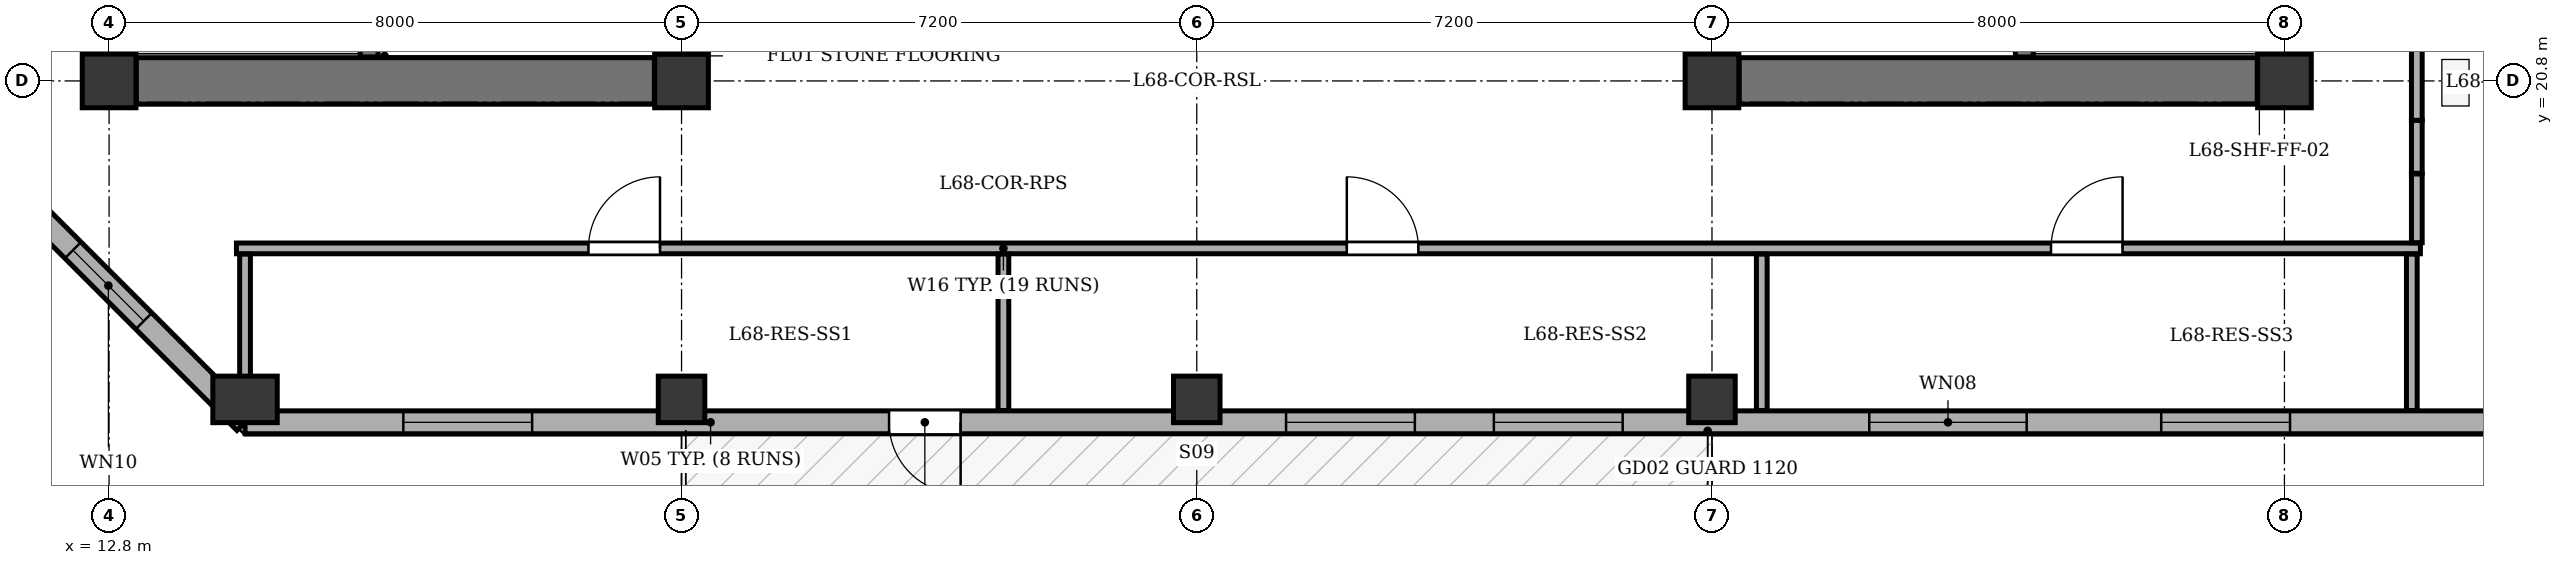
"""IFC4 building model, lengths in metres.
Left out: names, types, materials, properties, quantities, classifications, styles, units other than length and angle.
Written with IfcOpenShell. Run it as: python <this file> out.ifc"""

import sys

from ifc_helpers import new_model, si_unit, direction, frame, frame_2d, origin, origin_2d, place, context, subcontext, project, spatial, rectangle, extrude, element, fill, save


model = new_model("IFC4")
c1 = context("Model", 3, precision=1e-05, world=origin(), true_north=direction((0.0, 1.0)))
c2 = subcontext(c1, "Body", "Model", "MODEL_VIEW")
j1 = project(units=[si_unit("LENGTHUNIT", "METRE"), si_unit("PLANEANGLEUNIT", "RADIAN")], contexts=[c1])
p1 = place(None, origin())
s1 = spatial("IfcSite", under=j1, at=p1, CompositionType="ELEMENT")
p2 = place(p1, origin())
s2 = spatial("IfcBuilding", under=s1, at=p2, CompositionType="ELEMENT")
p3 = place(p2, frame((0.0, 0.0, 258.5)))
s3 = spatial("IfcBuildingStorey", under=s2, at=p3, CompositionType="ELEMENT", Elevation=258.5)
for number, where, z_axis, x_axis in (
    (1, (12.8, 20.8, 0.0), (0.0, 0.0, 1.0), (1.0, 0.0, 0.0)),
    (2, (20.8, 20.8, 0.0), (0.0, 0.0, 1.0), (1.0, 0.0, 0.0)),
    (3, (35.2, 20.8, 0.0), (0.0, 0.0, 1.0), (1.0, 0.0, 0.0)),
    (4, (43.2, 20.8, 0.0), (0.0, 0.0, 1.0), (1.0, 0.0, 0.0)),
):
    element("IfcColumn", number, at=place(p3, frame(where, z_axis=z_axis, x_axis=x_axis)), inside=s3, PredefinedType="COLUMN", context=c2, shape_type="SweptSolid", body=[
        extrude(rectangle(XDim=0.75, YDim=0.75, at=origin_2d()), origin(), (0.0, 0.0, 1.0), 3.4),
    ])
p4 = place(p3, frame((14.7, 16.35, 0.0), z_axis=(0.0, 0.0, 1.0), x_axis=(1.0, 0.0, 0.0)))
e5 = element("IfcColumn", 5, at=p4, inside=s3, PredefinedType="COLUMN", context=c2, shape_type="SweptSolid", body=[
    extrude(rectangle(XDim=0.65, YDim=0.9, at=origin_2d()), origin(), (0.0, 0.0, 1.0), 3.4),
])
for number, where, z_axis, x_axis in (
    (6, (20.8, 16.35, 0.0), (0.0, 0.0, 1.0), (1.0, 0.0, 0.0)),
    (7, (28.0, 16.35, 0.0), (0.0, 0.0, 1.0), (1.0, 0.0, 0.0)),
    (8, (35.2, 16.35, 0.0), (0.0, 0.0, 1.0), (1.0, 0.0, 0.0)),
):
    element("IfcColumn", number, at=place(p3, frame(where, z_axis=z_axis, x_axis=x_axis)), inside=s3, PredefinedType="COLUMN", context=c2, shape_type="SweptSolid", body=[
        extrude(rectangle(XDim=0.65, YDim=0.65, at=origin_2d()), origin(), (0.0, 0.0, 1.0), 3.4),
    ])
p5 = place(p3, frame((51.7, 16.03, 0.0), z_axis=(0.0, 0.0, 1.0), x_axis=(-1.0, 0.0, 0.0)))
e9 = element("IfcWall", 9, at=p5, inside=s3, PredefinedType="STANDARD", context=c2, shape_type="SweptSolid", body=[
    extrude(rectangle(XDim=37.0, YDim=0.32, at=frame_2d((18.5, 0.0))), origin(), (0.0, 0.0, 1.0), 2.725),
])
p6 = place(p5, frame((27.0, 0.0, 0.0)))
e10 = element("IfcOpeningElement", 10, at=p6, cuts=e9, PredefinedType="OPENING", context=c2, shape_type="SweptSolid", body=[
    extrude(rectangle(XDim=1.0, YDim=2.02, at=frame_2d((0.5, 1.01))), frame((0.0, 0.17, 0.0), z_axis=(0.0, -1.0, 0.0), x_axis=(1.0, 0.0, 0.0)), (0.0, 0.0, 1.0), 0.34),
])
p7 = place(p5, frame((1.235, 0.0, 0.75)))
e11 = element("IfcOpeningElement", 11, at=p7, cuts=e9, PredefinedType="OPENING", context=c2, shape_type="SweptSolid", body=[
    extrude(rectangle(XDim=1.8, YDim=1.7, at=frame_2d((0.9, 0.85))), frame((0.0, 0.17, 0.0), z_axis=(0.0, -1.0, 0.0), x_axis=(1.0, 0.0, 0.0)), (0.0, 0.0, 1.0), 0.34),
])
p8 = place(p5, frame((3.885, 0.0, 0.75)))
e12 = element("IfcOpeningElement", 12, at=p8, cuts=e9, PredefinedType="OPENING", context=c2, shape_type="SweptSolid", body=[
    extrude(rectangle(XDim=1.8, YDim=1.7, at=frame_2d((0.9, 0.85))), frame((0.0, 0.17, 0.0), z_axis=(0.0, -1.0, 0.0), x_axis=(1.0, 0.0, 0.0)), (0.0, 0.0, 1.0), 0.34),
])
p9 = place(p5, frame((8.422, 0.0, 0.75)))
e13 = element("IfcOpeningElement", 13, at=p9, cuts=e9, PredefinedType="OPENING", context=c2, shape_type="SweptSolid", body=[
    extrude(rectangle(XDim=1.8, YDim=1.7, at=frame_2d((0.9, 0.85))), frame((0.0, 0.17, 0.0), z_axis=(0.0, -1.0, 0.0), x_axis=(1.0, 0.0, 0.0)), (0.0, 0.0, 1.0), 0.34),
])
p10 = place(p5, frame((12.102, 0.0, 0.75)))
e14 = element("IfcOpeningElement", 14, at=p10, cuts=e9, PredefinedType="OPENING", context=c2, shape_type="SweptSolid", body=[
    extrude(rectangle(XDim=2.2, YDim=1.7, at=frame_2d((1.1, 0.85))), frame((0.0, 0.17, 0.0), z_axis=(0.0, -1.0, 0.0), x_axis=(1.0, 0.0, 0.0)), (0.0, 0.0, 1.0), 0.34),
])
p11 = place(p5, frame((17.748, 0.0, 0.75)))
e15 = element("IfcOpeningElement", 15, at=p11, cuts=e9, PredefinedType="OPENING", context=c2, shape_type="SweptSolid", body=[
    extrude(rectangle(XDim=1.8, YDim=1.7, at=frame_2d((0.9, 0.85))), frame((0.0, 0.17, 0.0), z_axis=(0.0, -1.0, 0.0), x_axis=(1.0, 0.0, 0.0)), (0.0, 0.0, 1.0), 0.34),
])
p12 = place(p5, frame((20.652, 0.0, 0.75)))
e16 = element("IfcOpeningElement", 16, at=p12, cuts=e9, PredefinedType="OPENING", context=c2, shape_type="SweptSolid", body=[
    extrude(rectangle(XDim=1.8, YDim=1.7, at=frame_2d((0.9, 0.85))), frame((0.0, 0.17, 0.0), z_axis=(0.0, -1.0, 0.0), x_axis=(1.0, 0.0, 0.0)), (0.0, 0.0, 1.0), 0.34),
])
p13 = place(p5, frame((32.988, 0.0, 0.75)))
e17 = element("IfcOpeningElement", 17, at=p13, cuts=e9, PredefinedType="OPENING", context=c2, shape_type="SweptSolid", body=[
    extrude(rectangle(XDim=1.8, YDim=1.7, at=frame_2d((0.9, 0.85))), frame((0.0, 0.17, 0.0), z_axis=(0.0, -1.0, 0.0), x_axis=(1.0, 0.0, 0.0)), (0.0, 0.0, 1.0), 0.34),
])
p14 = place(p3, frame((14.7, 16.03, 0.0), z_axis=(0.0, 0.0, 1.0), x_axis=(-0.707106781187, 0.707106781187, 0.0)))
e18 = element("IfcWall", 18, at=p14, inside=s3, PredefinedType="STANDARD", context=c2, shape_type="SweptSolid", body=[
    extrude(rectangle(XDim=5.402, YDim=0.32, at=frame_2d((2.701, 0.0))), origin(), (0.0, 0.0, 1.0), 2.725),
])
p15 = place(p14, frame((2.001, 0.0, 0.75)))
e19 = element("IfcOpeningElement", 19, at=p15, cuts=e18, PredefinedType="OPENING", context=c2, shape_type="SweptSolid", body=[
    extrude(rectangle(XDim=1.4, YDim=1.65, at=frame_2d((0.7, 0.825))), frame((0.0, 0.17, 0.0), z_axis=(0.0, -1.0, 0.0), x_axis=(1.0, 0.0, 0.0)), (0.0, 0.0, 1.0), 0.34),
])
p16 = place(p3, frame((12.8, 21.18, 0.0), z_axis=(0.0, 0.0, 1.0), x_axis=(0.0, 1.0, 0.0)))
e20 = element("IfcWall", 20, at=p16, inside=s3, PredefinedType="SHEAR", context=c2, shape_type="SweptSolid", body=[
    extrude(rectangle(XDim=12.04, YDim=0.65, at=frame_2d((6.02, 0.0))), origin(), (0.0, 0.0, 1.0), 3.1),
])
p17 = place(p3, frame((13.18, 20.8, 0.0), z_axis=(0.0, 0.0, 1.0), x_axis=(1.0, 0.0, 0.0)))
e21 = element("IfcWall", 21, at=p17, inside=s3, PredefinedType="SHEAR", context=c2, shape_type="SweptSolid", body=[
    extrude(rectangle(XDim=7.24, YDim=0.65, at=frame_2d((3.62, 0.0))), origin(), (0.0, 0.0, 1.0), 3.1),
])
p18 = place(p3, frame((20.8, 21.18, 0.0), z_axis=(0.0, 0.0, 1.0), x_axis=(0.0, 1.0, 0.0)))
e22 = element("IfcWall", 22, at=p18, inside=s3, PredefinedType="SHEAR", context=c2, shape_type="SweptSolid", body=[
    extrude(rectangle(XDim=3.87, YDim=0.65, at=frame_2d((1.935, 0.0))), origin(), (0.0, 0.0, 1.0), 3.1),
])
p19 = place(p18, frame((1.42, 0.0, 0.0)))
e23 = element("IfcOpeningElement", 23, at=p19, cuts=e22, PredefinedType="OPENING", context=c2, shape_type="SweptSolid", body=[
    extrude(rectangle(XDim=1.2, YDim=2.15, at=frame_2d((0.6, 1.075))), frame((0.0, 0.335, 0.0), z_axis=(0.0, -1.0, 0.0), x_axis=(1.0, 0.0, 0.0)), (0.0, 0.0, 1.0), 0.67),
])
p20 = place(p3, frame((16.435, 21.135, 0.0), z_axis=(0.0, 0.0, 1.0), x_axis=(0.0, 1.0, 0.0)))
e24 = element("IfcWall", 24, at=p20, inside=s3, PredefinedType="SHEAR", context=c2, shape_type="SweptSolid", body=[
    extrude(rectangle(XDim=12.13, YDim=0.25, at=frame_2d((6.065, 0.0))), origin(), (0.0, 0.0, 1.0), 3.1),
])
p21 = place(p20, frame((0.515, 0.0, 0.0)))
e25 = element("IfcOpeningElement", 25, at=p21, cuts=e24, PredefinedType="OPENING", context=c2, shape_type="SweptSolid", body=[
    extrude(rectangle(XDim=1.2, YDim=2.15, at=frame_2d((0.6, 1.075))), frame((0.0, 0.135, 0.0), z_axis=(0.0, -1.0, 0.0), x_axis=(1.0, 0.0, 0.0)), (0.0, 0.0, 1.0), 0.27),
])
p22 = place(p20, frame((2.665, 0.0, 0.0)))
e26 = element("IfcOpeningElement", 26, at=p22, cuts=e24, PredefinedType="OPENING", context=c2, shape_type="SweptSolid", body=[
    extrude(rectangle(XDim=1.15, YDim=2.15, at=frame_2d((0.575, 1.075))), frame((0.0, 0.135, 0.0), z_axis=(0.0, -1.0, 0.0), x_axis=(1.0, 0.0, 0.0)), (0.0, 0.0, 1.0), 0.27),
])
p23 = place(p3, frame((43.2, 21.18, 0.0), z_axis=(0.0, 0.0, 1.0), x_axis=(0.0, 1.0, 0.0)))
e27 = element("IfcWall", 27, at=p23, inside=s3, PredefinedType="SHEAR", context=c2, shape_type="SweptSolid", body=[
    extrude(rectangle(XDim=12.04, YDim=0.65, at=frame_2d((6.02, 0.0))), origin(), (0.0, 0.0, 1.0), 3.1),
])
p24 = place(p3, frame((35.58, 20.8, 0.0), z_axis=(0.0, 0.0, 1.0), x_axis=(1.0, 0.0, 0.0)))
e28 = element("IfcWall", 28, at=p24, inside=s3, PredefinedType="SHEAR", context=c2, shape_type="SweptSolid", body=[
    extrude(rectangle(XDim=7.24, YDim=0.65, at=frame_2d((3.62, 0.0))), origin(), (0.0, 0.0, 1.0), 3.1),
])
p25 = place(p3, frame((35.2, 21.18, 0.0), z_axis=(0.0, 0.0, 1.0), x_axis=(0.0, 1.0, 0.0)))
e29 = element("IfcWall", 29, at=p25, inside=s3, PredefinedType="SHEAR", context=c2, shape_type="SweptSolid", body=[
    extrude(rectangle(XDim=3.87, YDim=0.65, at=frame_2d((1.935, 0.0))), origin(), (0.0, 0.0, 1.0), 3.1),
])
p26 = place(p25, frame((1.42, 0.0, 0.0)))
e30 = element("IfcOpeningElement", 30, at=p26, cuts=e29, PredefinedType="OPENING", context=c2, shape_type="SweptSolid", body=[
    extrude(rectangle(XDim=1.2, YDim=2.15, at=frame_2d((0.6, 1.075))), frame((0.0, 0.335, 0.0), z_axis=(0.0, -1.0, 0.0), x_axis=(1.0, 0.0, 0.0)), (0.0, 0.0, 1.0), 0.67),
])
p27 = place(p3, frame((39.565, 21.135, 0.0), z_axis=(0.0, 0.0, 1.0), x_axis=(0.0, 1.0, 0.0)))
e31 = element("IfcWall", 31, at=p27, inside=s3, PredefinedType="SHEAR", context=c2, shape_type="SweptSolid", body=[
    extrude(rectangle(XDim=12.13, YDim=0.25, at=frame_2d((6.065, 0.0))), origin(), (0.0, 0.0, 1.0), 3.1),
])
p28 = place(p27, frame((0.515, 0.0, 0.0)))
e32 = element("IfcOpeningElement", 32, at=p28, cuts=e31, PredefinedType="OPENING", context=c2, shape_type="SweptSolid", body=[
    extrude(rectangle(XDim=1.2, YDim=2.15, at=frame_2d((0.6, 1.075))), frame((0.0, 0.135, 0.0), z_axis=(0.0, -1.0, 0.0), x_axis=(1.0, 0.0, 0.0)), (0.0, 0.0, 1.0), 0.27),
])
p29 = place(p27, frame((2.665, 0.0, 0.0)))
e33 = element("IfcOpeningElement", 33, at=p29, cuts=e31, PredefinedType="OPENING", context=c2, shape_type="SweptSolid", body=[
    extrude(rectangle(XDim=1.15, YDim=2.15, at=frame_2d((0.575, 1.075))), frame((0.0, 0.135, 0.0), z_axis=(0.0, -1.0, 0.0), x_axis=(1.0, 0.0, 0.0)), (0.0, 0.0, 1.0), 0.27),
])
p30 = place(p3, frame((14.58, 18.46, 0.0), z_axis=(0.0, 0.0, 1.0), x_axis=(1.0, 0.0, 0.0)))
e34 = element("IfcWall", 34, at=p30, inside=s3, PredefinedType="PARTITIONING", context=c2, shape_type="SweptSolid", body=[
    extrude(rectangle(XDim=30.52, YDim=0.15, at=frame_2d((15.26, 0.0))), origin(), (0.0, 0.0, 1.0), 3.1),
])
p31 = place(p30, frame((4.919, 0.0, 0.0)))
e35 = element("IfcOpeningElement", 35, at=p31, cuts=e34, PredefinedType="OPENING", context=c2, shape_type="SweptSolid", body=[
    extrude(rectangle(XDim=1.0, YDim=2.1, at=frame_2d((0.5, 1.05))), frame((0.0, 0.085, 0.0), z_axis=(0.0, -1.0, 0.0), x_axis=(1.0, 0.0, 0.0)), (0.0, 0.0, 1.0), 0.17),
])
p32 = place(p30, frame((15.517, 0.0, 0.0)))
e36 = element("IfcOpeningElement", 36, at=p32, cuts=e34, PredefinedType="OPENING", context=c2, shape_type="SweptSolid", body=[
    extrude(rectangle(XDim=1.0, YDim=2.1, at=frame_2d((0.5, 1.05))), frame((0.0, 0.085, 0.0), z_axis=(0.0, -1.0, 0.0), x_axis=(1.0, 0.0, 0.0)), (0.0, 0.0, 1.0), 0.17),
])
p33 = place(p30, frame((25.358, 0.0, 0.0)))
e37 = element("IfcOpeningElement", 37, at=p33, cuts=e34, PredefinedType="OPENING", context=c2, shape_type="SweptSolid", body=[
    extrude(rectangle(XDim=1.0, YDim=2.1, at=frame_2d((0.5, 1.05))), frame((0.0, 0.085, 0.0), z_axis=(0.0, -1.0, 0.0), x_axis=(1.0, 0.0, 0.0)), (0.0, 0.0, 1.0), 0.17),
])
for number, where, z_axis, x_axis in (
    (38, (14.7, 16.195, 0.0), (0.0, 0.0, 1.0), (0.0, 1.0, 0.0)),
    (39, (25.298, 16.195, 0.0), (0.0, 0.0, 1.0), (0.0, 1.0, 0.0)),
    (40, (35.896, 16.195, 0.0), (0.0, 0.0, 1.0), (0.0, 1.0, 0.0)),
):
    element("IfcWall", number, at=place(p3, frame(where, z_axis=z_axis, x_axis=x_axis)), inside=s3, PredefinedType="PARTITIONING", context=c2, shape_type="SweptSolid", body=[
        extrude(rectangle(XDim=2.185, YDim=0.15, at=frame_2d((1.092, 0.0))), origin(), (0.0, 0.0, 1.0), 3.1),
    ])
p34 = place(p3, frame((44.98, 16.195, 0.0), z_axis=(0.0, 0.0, 1.0), x_axis=(0.0, 1.0, 0.0)))
e41 = element("IfcWall", 41, at=p34, inside=s3, PredefinedType="PARTITIONING", context=c2, shape_type="SweptSolid", body=[
    extrude(rectangle(XDim=2.185, YDim=0.15, at=frame_2d((1.092, 0.0))), origin(), (0.0, 0.0, 1.0), 2.725),
])
p35 = place(p3, frame((45.05, 19.5, 0.0), z_axis=(0.0, 0.0, 1.0), x_axis=(0.0, -1.0, 0.0)))
e42 = element("IfcWall", 42, at=p35, inside=s3, PredefinedType="PARTITIONING", context=c2, shape_type="SweptSolid", body=[
    extrude(rectangle(XDim=0.96, YDim=0.15, at=frame_2d((0.48, 0.0))), origin(), (0.0, 0.0, 1.0), 2.725),
])
p36 = place(p3, frame((45.05, 19.51, 0.0), z_axis=(0.0, 0.0, 1.0), x_axis=(0.0, 1.0, 0.0)))
e43 = element("IfcWall", 43, at=p36, inside=s3, PredefinedType="PARTITIONING", context=c2, shape_type="SweptSolid", body=[
    extrude(rectangle(XDim=0.74, YDim=0.15, at=frame_2d((0.37, 0.0))), origin(), (0.0, 0.0, 1.0), 2.725),
])
p37 = place(p3, frame((45.05, 20.25, 0.0), z_axis=(0.0, 0.0, 1.0), x_axis=(0.0, 1.0, 0.0)))
e44 = element("IfcWall", 44, at=p37, inside=s3, PredefinedType="PARTITIONING", context=c2, shape_type="SweptSolid", body=[
    extrude(rectangle(XDim=13.9, YDim=0.15, at=frame_2d((6.95, 0.0))), origin(), (0.0, 0.0, 1.0), 2.725),
])
p38 = place(p6, origin())
e45 = element("IfcDoor", 45, at=p38, inside=s3, OperationType="SINGLE_SWING_LEFT", PredefinedType="DOOR", context=c2, shape_type="SweptSolid", body=[
    extrude(rectangle(XDim=1.0, YDim=2.02, at=frame_2d((0.5, 1.01))), frame((0.0, 0.025, 0.0), z_axis=(0.0, -1.0, 0.0), x_axis=(1.0, 0.0, 0.0)), (0.0, 0.0, 1.0), 0.05),
])
fill(e10, e45)
p39 = place(p9, origin())
e46 = element("IfcWindow", 46, at=p39, inside=s3, PartitioningType="SINGLE_PANEL", PredefinedType="WINDOW", context=c2, shape_type="SweptSolid", body=[
    extrude(rectangle(XDim=1.8, YDim=1.7, at=frame_2d((0.9, 0.85))), frame((0.0, -0.01, 0.0), z_axis=(0.0, -1.0, 0.0), x_axis=(1.0, 0.0, 0.0)), (0.0, 0.0, 1.0), 0.06),
])
fill(e13, e46)
p40 = place(p10, origin())
e47 = element("IfcWindow", 47, at=p40, inside=s3, PartitioningType="SINGLE_PANEL", PredefinedType="WINDOW", context=c2, shape_type="SweptSolid", body=[
    extrude(rectangle(XDim=2.2, YDim=1.7, at=frame_2d((1.1, 0.85))), frame((0.0, -0.01, 0.0), z_axis=(0.0, -1.0, 0.0), x_axis=(1.0, 0.0, 0.0)), (0.0, 0.0, 1.0), 0.06),
])
fill(e14, e47)
p41 = place(p11, origin())
e48 = element("IfcWindow", 48, at=p41, inside=s3, PartitioningType="SINGLE_PANEL", PredefinedType="WINDOW", context=c2, shape_type="SweptSolid", body=[
    extrude(rectangle(XDim=1.8, YDim=1.7, at=frame_2d((0.9, 0.85))), frame((0.0, -0.01, 0.0), z_axis=(0.0, -1.0, 0.0), x_axis=(1.0, 0.0, 0.0)), (0.0, 0.0, 1.0), 0.06),
])
fill(e15, e48)
p42 = place(p12, origin())
e49 = element("IfcWindow", 49, at=p42, inside=s3, PartitioningType="SINGLE_PANEL", PredefinedType="WINDOW", context=c2, shape_type="SweptSolid", body=[
    extrude(rectangle(XDim=1.8, YDim=1.7, at=frame_2d((0.9, 0.85))), frame((0.0, -0.01, 0.0), z_axis=(0.0, -1.0, 0.0), x_axis=(1.0, 0.0, 0.0)), (0.0, 0.0, 1.0), 0.06),
])
fill(e16, e49)
p43 = place(p13, origin())
e50 = element("IfcWindow", 50, at=p43, inside=s3, PartitioningType="SINGLE_PANEL", PredefinedType="WINDOW", context=c2, shape_type="SweptSolid", body=[
    extrude(rectangle(XDim=1.8, YDim=1.7, at=frame_2d((0.9, 0.85))), frame((0.0, -0.01, 0.0), z_axis=(0.0, -1.0, 0.0), x_axis=(1.0, 0.0, 0.0)), (0.0, 0.0, 1.0), 0.06),
])
fill(e17, e50)
p44 = place(p15, origin())
e51 = element("IfcWindow", 51, at=p44, inside=s3, PartitioningType="SINGLE_PANEL", PredefinedType="WINDOW", context=c2, shape_type="SweptSolid", body=[
    extrude(rectangle(XDim=1.4, YDim=1.65, at=frame_2d((0.7, 0.825))), frame((0.0, -0.01, 0.0), z_axis=(0.0, -1.0, 0.0), x_axis=(1.0, 0.0, 0.0)), (0.0, 0.0, 1.0), 0.06),
])
fill(e19, e51)
p45 = place(p31, origin())
e52 = element("IfcDoor", 52, at=p45, inside=s3, OperationType="SINGLE_SWING_RIGHT", PredefinedType="DOOR", context=c2, shape_type="SweptSolid", body=[
    extrude(rectangle(XDim=1.0, YDim=2.1, at=frame_2d((0.5, 1.05))), frame((0.0, 0.025, 0.0), z_axis=(0.0, -1.0, 0.0), x_axis=(1.0, 0.0, 0.0)), (0.0, 0.0, 1.0), 0.05),
])
fill(e35, e52)
p46 = place(p32, origin())
e53 = element("IfcDoor", 53, at=p46, inside=s3, OperationType="SINGLE_SWING_LEFT", PredefinedType="DOOR", context=c2, shape_type="SweptSolid", body=[
    extrude(rectangle(XDim=1.0, YDim=2.1, at=frame_2d((0.5, 1.05))), frame((0.0, 0.025, 0.0), z_axis=(0.0, -1.0, 0.0), x_axis=(1.0, 0.0, 0.0)), (0.0, 0.0, 1.0), 0.05),
])
fill(e36, e53)
p47 = place(p33, origin())
e54 = element("IfcDoor", 54, at=p47, inside=s3, OperationType="SINGLE_SWING_RIGHT", PredefinedType="DOOR", context=c2, shape_type="SweptSolid", body=[
    extrude(rectangle(XDim=1.0, YDim=2.1, at=frame_2d((0.5, 1.05))), frame((0.0, 0.025, 0.0), z_axis=(0.0, -1.0, 0.0), x_axis=(1.0, 0.0, 0.0)), (0.0, 0.0, 1.0), 0.05),
])
fill(e37, e54)
save(model, sys.argv[1])
